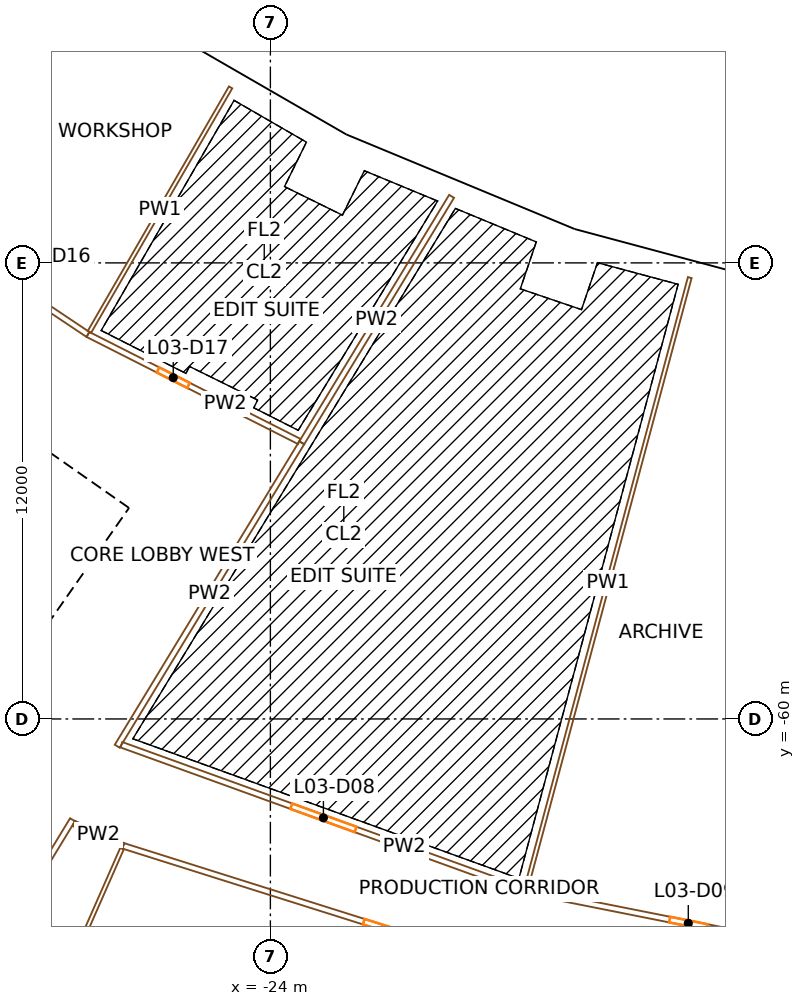
"""IFC4 building model, lengths in metres.
Left out: names, types, materials, properties, quantities, classifications, styles, units other than length and angle.
Written with IfcOpenShell. Run it as: python <this file> out.ifc"""

import sys

from ifc_helpers import new_model, si_unit, direction, frame, frame_2d, origin, origin_2d, place, context, subcontext, project, spatial, rectangle, extrude, element, fill, save


model = new_model("IFC4")
c1 = context("Model", 3, precision=1e-05, world=origin(), true_north=direction((0.0, 1.0)))
c2 = subcontext(c1, "Body", "Model", "MODEL_VIEW")
j1 = project(units=[si_unit("LENGTHUNIT", "METRE"), si_unit("PLANEANGLEUNIT", "RADIAN")], contexts=[c1])
p1 = place(None, origin())
s1 = spatial("IfcSite", under=j1, at=p1, CompositionType="ELEMENT")
p2 = place(p1, origin())
s2 = spatial("IfcBuilding", under=s1, at=p2, CompositionType="ELEMENT")
p3 = place(p2, frame((0.0, 0.0, 27.0)))
s3 = spatial("IfcBuildingStorey", under=s2, at=p3, CompositionType="ELEMENT", Elevation=27.0)
for number, where, z_axis, x_axis in (
    (1, (-28.195, -42.197, 0.0), (0.0, 0.0, 1.0), (0.831, -0.556, 0.0)),
    (2, (-22.446, -45.516, 0.0), (0.0, 0.0, 1.0), (0.897, -0.442, 0.0)),
):
    element("IfcColumn", number, at=place(p3, frame(where, z_axis=z_axis, x_axis=x_axis)), inside=s3, PredefinedType="COLUMN", context=c2, shape_type="SweptSolid", body=[
        extrude(rectangle(XDim=1.1, YDim=1.3, at=origin_2d()), origin(), (0.0, 0.0, 1.0), 4.5),
    ])
p4 = place(p3, frame((-25.763, -52.243, 0.0), z_axis=(0.0, 0.0, 1.0), x_axis=(0.896872741533, -0.442288690219, 0.0)))
e3 = element("IfcColumn", 3, at=p4, inside=s3, PredefinedType="COLUMN", context=c2, shape_type="SweptSolid", body=[
    extrude(rectangle(XDim=1.4, YDim=1.8, at=origin_2d()), origin(), (0.0, 0.0, 1.0), 4.5),
])
p5 = place(p3, frame((-16.313, -48.057, 0.0), z_axis=(0.0, 0.0, 1.0), x_axis=(0.946930129495, -0.321439465303, 0.0)))
e4 = element("IfcColumn", 4, at=p5, inside=s3, PredefinedType="COLUMN", context=c2, shape_type="SweptSolid", body=[
    extrude(rectangle(XDim=1.1, YDim=1.3, at=origin_2d()), origin(), (0.0, 0.0, 1.0), 4.5),
])
for number, where, z_axis, x_axis in (
    (5, (-18.724, -55.159, 0.0), (0.0, 0.0, 1.0), (0.947, -0.321, 0.0)),
    (6, (-11.364, -57.131, 0.0), (0.0, 0.0, 1.0), (0.981, -0.195, 0.0)),
):
    element("IfcColumn", number, at=place(p3, frame(where, z_axis=z_axis, x_axis=x_axis)), inside=s3, PredefinedType="COLUMN", context=c2, shape_type="SweptSolid", body=[
        extrude(rectangle(XDim=1.4, YDim=1.8, at=origin_2d()), origin(), (0.0, 0.0, 1.0), 4.5),
    ])
p6 = place(p3, frame((-36.717, -66.337, 0.0), z_axis=(0.0, 0.0, 1.0), x_axis=(0.573577477574, 0.819151315216, 0.0)))
e7 = element("IfcWall", 7, at=p6, inside=s3, PredefinedType="SHEAR", context=c2, shape_type="SweptSolid", body=[
    extrude(rectangle(XDim=14.8, YDim=0.9, at=frame_2d((7.4, 0.0))), origin(), (0.0, 0.0, 1.0), 4.1),
])
p7 = place(p6, frame((6.2, 0.0, 0.0)))
e8 = element("IfcOpeningElement", 8, at=p7, cuts=e7, PredefinedType="OPENING", context=c2, shape_type="SweptSolid", body=[
    extrude(rectangle(XDim=2.4, YDim=2.1, at=frame_2d((1.2, 1.05))), frame((0.0, 0.46, 0.0), z_axis=(0.0, -1.0, 0.0), x_axis=(1.0, 0.0, 0.0)), (0.0, 0.0, 1.0), 0.92),
])
p8 = place(p3, frame((-28.854, -54.324, 0.0), z_axis=(0.0, 0.0, 1.0), x_axis=(-0.819145767589, 0.573585400304, 0.0)))
e9 = element("IfcWall", 9, at=p8, inside=s3, PredefinedType="SHEAR", context=c2, shape_type="SweptSolid", body=[
    extrude(rectangle(XDim=15.045, YDim=0.9, at=frame_2d((7.523, 0.0))), origin(), (0.0, 0.0, 1.0), 4.1),
])
p9 = place(p8, frame((0.6, 0.0, 0.0)))
e10 = element("IfcOpeningElement", 10, at=p9, cuts=e9, PredefinedType="OPENING", context=c2, shape_type="SweptSolid", body=[
    extrude(rectangle(XDim=1.0, YDim=2.1, at=frame_2d((0.5, 1.05))), frame((0.0, 0.46, 0.0), z_axis=(0.0, -1.0, 0.0), x_axis=(1.0, 0.0, 0.0)), (0.0, 0.0, 1.0), 0.92),
])
p10 = place(p8, frame((3.275, 0.0, 0.0)))
e11 = element("IfcOpeningElement", 11, at=p10, cuts=e9, PredefinedType="OPENING", context=c2, shape_type="SweptSolid", body=[
    extrude(rectangle(XDim=1.0, YDim=2.1, at=frame_2d((0.5, 1.05))), frame((0.0, 0.46, 0.0), z_axis=(0.0, -1.0, 0.0), x_axis=(1.0, 0.0, 0.0)), (0.0, 0.0, 1.0), 0.92),
])
p11 = place(p8, frame((6.225, 0.0, 0.0)))
e12 = element("IfcOpeningElement", 12, at=p11, cuts=e9, PredefinedType="OPENING", context=c2, shape_type="SweptSolid", body=[
    extrude(rectangle(XDim=0.9, YDim=2.1, at=frame_2d((0.45, 1.05))), frame((0.0, 0.46, 0.0), z_axis=(0.0, -1.0, 0.0), x_axis=(1.0, 0.0, 0.0)), (0.0, 0.0, 1.0), 0.92),
])
p12 = place(p8, frame((13.495, 0.0, 0.0)))
e13 = element("IfcOpeningElement", 13, at=p12, cuts=e9, PredefinedType="OPENING", context=c2, shape_type="SweptSolid", body=[
    extrude(rectangle(XDim=1.1, YDim=2.1, at=frame_2d((0.55, 1.05))), frame((0.0, 0.46, 0.0), z_axis=(0.0, -1.0, 0.0), x_axis=(1.0, 0.0, 0.0)), (0.0, 0.0, 1.0), 0.92),
])
p13 = place(p3, frame((-22.155, -44.792, 0.0), z_axis=(0.0, 0.0, 1.0), x_axis=(-0.866022817921, 0.50000447882, 0.0)))
e14 = element("IfcWall", 14, at=p13, inside=s3, PredefinedType="SOLIDWALL", context=c2, shape_type="SweptSolid", body=[
    extrude(rectangle(XDim=6.419, YDim=0.45, at=frame_2d((3.21, 0.0))), origin(), (0.0, 0.0, 1.0), 3.2),
])
p14 = place(p13, frame((3.66, 0.0, 0.9)))
e15 = element("IfcOpeningElement", 15, at=p14, cuts=e14, PredefinedType="OPENING", context=c2, shape_type="SweptSolid", body=[
    extrude(rectangle(XDim=1.2, YDim=2.15, at=frame_2d((0.6, 1.075))), frame((0.0, 0.235, 0.0), z_axis=(0.0, -1.0, 0.0), x_axis=(1.0, 0.0, 0.0)), (0.0, 0.0, 1.0), 0.47),
])
p15 = place(p13, frame((1.56, 0.0, 0.9)))
e16 = element("IfcOpeningElement", 16, at=p15, cuts=e14, PredefinedType="OPENING", context=c2, shape_type="SweptSolid", body=[
    extrude(rectangle(XDim=1.2, YDim=2.15, at=frame_2d((0.6, 1.075))), frame((0.0, 0.235, 0.0), z_axis=(0.0, -1.0, 0.0), x_axis=(1.0, 0.0, 0.0)), (0.0, 0.0, 1.0), 0.47),
])
p16 = place(p3, frame((-16.036, -47.335, 0.0), z_axis=(0.0, 0.0, 1.0), x_axis=(-0.923877459804, 0.382688436284, 0.0)))
e17 = element("IfcWall", 17, at=p16, inside=s3, PredefinedType="SOLIDWALL", context=c2, shape_type="SweptSolid", body=[
    extrude(rectangle(XDim=6.597, YDim=0.45, at=frame_2d((3.299, 0.0))), origin(), (0.0, 0.0, 1.0), 3.2),
])
p17 = place(p16, frame((3.749, 0.0, 0.9)))
e18 = element("IfcOpeningElement", 18, at=p17, cuts=e17, PredefinedType="OPENING", context=c2, shape_type="SweptSolid", body=[
    extrude(rectangle(XDim=1.2, YDim=2.15, at=frame_2d((0.6, 1.075))), frame((0.0, 0.235, 0.0), z_axis=(0.0, -1.0, 0.0), x_axis=(1.0, 0.0, 0.0)), (0.0, 0.0, 1.0), 0.47),
])
p18 = place(p16, frame((1.648, 0.0, 0.9)))
e19 = element("IfcOpeningElement", 19, at=p18, cuts=e17, PredefinedType="OPENING", context=c2, shape_type="SweptSolid", body=[
    extrude(rectangle(XDim=1.2, YDim=2.15, at=frame_2d((0.6, 1.075))), frame((0.0, 0.235, 0.0), z_axis=(0.0, -1.0, 0.0), x_axis=(1.0, 0.0, 0.0)), (0.0, 0.0, 1.0), 0.47),
])
p19 = place(p3, frame((-9.807, -49.0, 0.0), z_axis=(0.0, 0.0, 1.0), x_axis=(-0.965926830738, 0.25881529642, 0.0)))
e20 = element("IfcWall", 20, at=p19, inside=s3, PredefinedType="SOLIDWALL", context=c2, shape_type="SweptSolid", body=[
    extrude(rectangle(XDim=6.419, YDim=0.45, at=frame_2d((3.209, 0.0))), origin(), (0.0, 0.0, 1.0), 3.2),
])
p20 = place(p19, frame((3.66, 0.0, 0.9)))
e21 = element("IfcOpeningElement", 21, at=p20, cuts=e20, PredefinedType="OPENING", context=c2, shape_type="SweptSolid", body=[
    extrude(rectangle(XDim=1.2, YDim=2.15, at=frame_2d((0.6, 1.075))), frame((0.0, 0.235, 0.0), z_axis=(0.0, -1.0, 0.0), x_axis=(1.0, 0.0, 0.0)), (0.0, 0.0, 1.0), 0.47),
])
p21 = place(p19, frame((1.56, 0.0, 0.9)))
e22 = element("IfcOpeningElement", 22, at=p21, cuts=e20, PredefinedType="OPENING", context=c2, shape_type="SweptSolid", body=[
    extrude(rectangle(XDim=1.2, YDim=2.15, at=frame_2d((0.6, 1.075))), frame((0.0, 0.235, 0.0), z_axis=(0.0, -1.0, 0.0), x_axis=(1.0, 0.0, 0.0)), (0.0, 0.0, 1.0), 0.47),
])
p22 = place(p3, frame((-35.065, -45.697, 0.0), z_axis=(0.0, 0.0, 1.0), x_axis=(0.831476555368, -0.555559841847, 0.0)))
e23 = element("IfcWall", 23, at=p22, inside=s3, PredefinedType="PARTITIONING", context=c2, shape_type="SweptSolid", body=[
    extrude(rectangle(XDim=7.534, YDim=0.15, at=frame_2d((3.767, 0.0))), origin(), (0.0, 0.0, 1.0), 3.1),
])
p23 = place(p22, frame((5.067, 0.0, 0.0)))
e24 = element("IfcOpeningElement", 24, at=p23, cuts=e23, PredefinedType="OPENING", context=c2, shape_type="SweptSolid", body=[
    extrude(rectangle(XDim=1.0, YDim=2.1, at=frame_2d((0.5, 1.05))), frame((0.0, 0.085, 0.0), z_axis=(0.0, -1.0, 0.0), x_axis=(1.0, 0.0, 0.0)), (0.0, 0.0, 1.0), 0.17),
])
p24 = place(p3, frame((-34.492, -78.383, 0.0), z_axis=(0.0, 0.0, 1.0), x_axis=(0.402767118416, 0.915302490067, 0.0)))
e25 = element("IfcWall", 25, at=p24, inside=s3, PredefinedType="PARTITIONING", context=c2, shape_type="SweptSolid", body=[
    extrude(rectangle(XDim=16.361, YDim=0.1, at=frame_2d((8.18, 0.0))), origin(), (0.0, 0.0, 1.0), 3.1),
])
p25 = place(p3, frame((-29.207, -62.652, 0.0), z_axis=(0.0, 0.0, 1.0), x_axis=(-0.519573423316, -0.854425805897, 0.0)))
e26 = element("IfcWall", 26, at=p25, inside=s3, PredefinedType="PARTITIONING", context=c2, shape_type="SweptSolid", body=[
    extrude(rectangle(XDim=9.726, YDim=0.15, at=frame_2d((4.863, 0.0))), origin(), (0.0, 0.0, 1.0), 3.1),
])
p26 = place(p25, frame((4.413, 0.0, 0.0)))
e27 = element("IfcOpeningElement", 27, at=p26, cuts=e26, PredefinedType="OPENING", context=c2, shape_type="SweptSolid", body=[
    extrude(rectangle(XDim=0.9, YDim=2.1, at=frame_2d((0.45, 1.05))), frame((0.0, 0.085, 0.0), z_axis=(0.0, -1.0, 0.0), x_axis=(1.0, 0.0, 0.0)), (0.0, 0.0, 1.0), 0.17),
])
p27 = place(p3, frame((-29.177, -62.747, 0.0), z_axis=(0.0, 0.0, 1.0), x_axis=(0.91081521274, -0.41281430237, 0.0)))
e28 = element("IfcWall", 28, at=p27, inside=s3, PredefinedType="PARTITIONING", context=c2, shape_type="SweptSolid", body=[
    extrude(rectangle(XDim=1.433, YDim=0.15, at=frame_2d((0.716, 0.0))), origin(), (0.0, 0.0, 1.0), 3.1),
])
p28 = place(p3, frame((-28.8, -49.883, 0.0), z_axis=(0.0, 0.0, 1.0), x_axis=(0.892095791335, -0.451846322418, 0.0)))
e29 = element("IfcWall", 29, at=p28, inside=s3, PredefinedType="PARTITIONING", context=c2, shape_type="SweptSolid", body=[
    extrude(rectangle(XDim=6.231, YDim=0.15, at=frame_2d((3.116, 0.0))), origin(), (0.0, 0.0, 1.0), 3.1),
])
p29 = place(p28, frame((2.066, 0.0, 0.0)))
e30 = element("IfcOpeningElement", 30, at=p29, cuts=e29, PredefinedType="OPENING", context=c2, shape_type="SweptSolid", body=[
    extrude(rectangle(XDim=0.9, YDim=2.1, at=frame_2d((0.45, 1.05))), frame((0.0, 0.085, 0.0), z_axis=(0.0, -1.0, 0.0), x_axis=(1.0, 0.0, 0.0)), (0.0, 0.0, 1.0), 0.17),
])
p30 = place(p3, frame((-27.92, -60.678, 0.0), z_axis=(0.0, 0.0, 1.0), x_axis=(0.940369024046, -0.340155991589, 0.0)))
e31 = element("IfcWall", 31, at=p30, inside=s3, PredefinedType="PARTITIONING", context=c2, shape_type="SweptSolid", body=[
    extrude(rectangle(XDim=11.305, YDim=0.15, at=frame_2d((5.652, 0.0))), origin(), (0.0, 0.0, 1.0), 3.1),
])
p31 = place(p30, frame((4.752, 0.0, 0.0)))
e32 = element("IfcOpeningElement", 32, at=p31, cuts=e31, PredefinedType="OPENING", context=c2, shape_type="SweptSolid", body=[
    extrude(rectangle(XDim=1.8, YDim=2.1, at=frame_2d((0.9, 1.05))), frame((0.0, 0.085, 0.0), z_axis=(0.0, -1.0, 0.0), x_axis=(1.0, 0.0, 0.0)), (0.0, 0.0, 1.0), 0.17),
])
p32 = place(p3, frame((-13.5, -67.87, 0.0), z_axis=(0.0, 0.0, 1.0), x_axis=(-0.953714063006, 0.300714958099, 0.0)))
e33 = element("IfcWall", 33, at=p32, inside=s3, PredefinedType="PARTITIONING", context=c2, shape_type="SweptSolid", body=[
    extrude(rectangle(XDim=15.069, YDim=0.15, at=frame_2d((7.535, 0.0))), origin(), (0.0, 0.0, 1.0), 3.1),
])
p33 = place(p32, frame((6.635, 0.0, 0.0)))
e34 = element("IfcOpeningElement", 34, at=p33, cuts=e33, PredefinedType="OPENING", context=c2, shape_type="SweptSolid", body=[
    extrude(rectangle(XDim=1.8, YDim=2.1, at=frame_2d((0.9, 1.05))), frame((0.0, 0.085, 0.0), z_axis=(0.0, -1.0, 0.0), x_axis=(1.0, 0.0, 0.0)), (0.0, 0.0, 1.0), 0.17),
])
p34 = place(p3, frame((-25.047, -43.382, 0.0), z_axis=(0.0, 0.0, 1.0), x_axis=(-0.500011569389, -0.866018724091, 0.0)))
e35 = element("IfcWall", 35, at=p34, inside=s3, PredefinedType="PARTITIONING", context=c2, shape_type="SweptSolid", body=[
    extrude(rectangle(XDim=7.431, YDim=0.1, at=frame_2d((3.716, 0.0))), origin(), (0.0, 0.0, 1.0), 3.1),
])
p35 = place(p3, frame((-23.174, -52.732, 0.0), z_axis=(0.0, 0.0, 1.0), x_axis=(-0.519577254173, -0.854423476355, 0.0)))
e36 = element("IfcWall", 36, at=p35, inside=s3, PredefinedType="PARTITIONING", context=c2, shape_type="SweptSolid", body=[
    extrude(rectangle(XDim=9.345, YDim=0.15, at=frame_2d((4.672, 0.0))), origin(), (0.0, 0.0, 1.0), 3.1),
])
p36 = place(p3, frame((-19.231, -46.249, 0.0), z_axis=(0.0, 0.0, 1.0), x_axis=(-0.519582509181, -0.854420280748, 0.0)))
e37 = element("IfcWall", 37, at=p36, inside=s3, PredefinedType="PARTITIONING", context=c2, shape_type="SweptSolid", body=[
    extrude(rectangle(XDim=7.588, YDim=0.15, at=frame_2d((3.794, 0.0))), origin(), (0.0, 0.0, 1.0), 3.1),
])
p37 = place(p3, frame((-17.289, -64.524, 0.0), z_axis=(0.0, 0.0, 1.0), x_axis=(0.980786466832, -0.195084357342, 0.0)))
e38 = element("IfcWall", 38, at=p37, inside=s3, PredefinedType="PARTITIONING", context=c2, shape_type="SweptSolid", body=[
    extrude(rectangle(XDim=8.738, YDim=0.15, at=frame_2d((4.369, 0.0))), origin(), (0.0, 0.0, 1.0), 3.1),
])
p38 = place(p37, frame((3.869, 0.0, 0.0)))
e39 = element("IfcOpeningElement", 39, at=p38, cuts=e38, PredefinedType="OPENING", context=c2, shape_type="SweptSolid", body=[
    extrude(rectangle(XDim=1.0, YDim=2.1, at=frame_2d((0.5, 1.05))), frame((0.0, 0.085, 0.0), z_axis=(0.0, -1.0, 0.0), x_axis=(1.0, 0.0, 0.0)), (0.0, 0.0, 1.0), 0.17),
])
p39 = place(p3, frame((-12.965, -48.386, 0.0), z_axis=(0.0, 0.0, 1.0), x_axis=(-0.258824622624, -0.965924331779, 0.0)))
e40 = element("IfcWall", 40, at=p39, inside=s3, PredefinedType="PARTITIONING", context=c2, shape_type="SweptSolid", body=[
    extrude(rectangle(XDim=16.632, YDim=0.1, at=frame_2d((8.316, 0.0))), origin(), (0.0, 0.0, 1.0), 3.1),
])
p40 = place(p9, origin())
e41 = element("IfcDoor", 41, at=p40, inside=s3, OperationType="SINGLE_SWING_RIGHT", PredefinedType="DOOR", context=c2, shape_type="SweptSolid", body=[
    extrude(rectangle(XDim=1.0, YDim=2.1, at=frame_2d((0.5, 1.05))), frame((0.0, 0.025, 0.0), z_axis=(0.0, -1.0, 0.0), x_axis=(1.0, 0.0, 0.0)), (0.0, 0.0, 1.0), 0.05),
])
fill(e10, e41)
p41 = place(p14, origin())
e42 = element("IfcWindow", 42, at=p41, inside=s3, PartitioningType="SINGLE_PANEL", PredefinedType="WINDOW", context=c2, shape_type="SweptSolid", body=[
    extrude(rectangle(XDim=1.2, YDim=2.15, at=frame_2d((0.6, 1.075))), frame((0.0, 0.03, 0.0), z_axis=(0.0, -1.0, 0.0), x_axis=(1.0, 0.0, 0.0)), (0.0, 0.0, 1.0), 0.06),
])
fill(e15, e42)
p42 = place(p15, origin())
e43 = element("IfcWindow", 43, at=p42, inside=s3, PartitioningType="SINGLE_PANEL", PredefinedType="WINDOW", context=c2, shape_type="SweptSolid", body=[
    extrude(rectangle(XDim=1.2, YDim=2.15, at=frame_2d((0.6, 1.075))), frame((0.0, 0.03, 0.0), z_axis=(0.0, -1.0, 0.0), x_axis=(1.0, 0.0, 0.0)), (0.0, 0.0, 1.0), 0.06),
])
fill(e16, e43)
p43 = place(p17, origin())
e44 = element("IfcWindow", 44, at=p43, inside=s3, PartitioningType="SINGLE_PANEL", PredefinedType="WINDOW", context=c2, shape_type="SweptSolid", body=[
    extrude(rectangle(XDim=1.2, YDim=2.15, at=frame_2d((0.6, 1.075))), frame((0.0, 0.03, 0.0), z_axis=(0.0, -1.0, 0.0), x_axis=(1.0, 0.0, 0.0)), (0.0, 0.0, 1.0), 0.06),
])
fill(e18, e44)
p44 = place(p18, origin())
e45 = element("IfcWindow", 45, at=p44, inside=s3, PartitioningType="SINGLE_PANEL", PredefinedType="WINDOW", context=c2, shape_type="SweptSolid", body=[
    extrude(rectangle(XDim=1.2, YDim=2.15, at=frame_2d((0.6, 1.075))), frame((0.0, 0.03, 0.0), z_axis=(0.0, -1.0, 0.0), x_axis=(1.0, 0.0, 0.0)), (0.0, 0.0, 1.0), 0.06),
])
fill(e19, e45)
p45 = place(p20, origin())
e46 = element("IfcWindow", 46, at=p45, inside=s3, PartitioningType="SINGLE_PANEL", PredefinedType="WINDOW", context=c2, shape_type="SweptSolid", body=[
    extrude(rectangle(XDim=1.2, YDim=2.15, at=frame_2d((0.6, 1.075))), frame((0.0, 0.03, 0.0), z_axis=(0.0, -1.0, 0.0), x_axis=(1.0, 0.0, 0.0)), (0.0, 0.0, 1.0), 0.06),
])
fill(e21, e46)
p46 = place(p21, origin())
e47 = element("IfcWindow", 47, at=p46, inside=s3, PartitioningType="SINGLE_PANEL", PredefinedType="WINDOW", context=c2, shape_type="SweptSolid", body=[
    extrude(rectangle(XDim=1.2, YDim=2.15, at=frame_2d((0.6, 1.075))), frame((0.0, 0.03, 0.0), z_axis=(0.0, -1.0, 0.0), x_axis=(1.0, 0.0, 0.0)), (0.0, 0.0, 1.0), 0.06),
])
fill(e22, e47)
p47 = place(p33, origin())
e48 = element("IfcDoor", 48, at=p47, inside=s3, OperationType="DOUBLE_DOOR_SINGLE_SWING", PredefinedType="DOOR", context=c2, shape_type="SweptSolid", body=[
    extrude(rectangle(XDim=1.8, YDim=2.1, at=frame_2d((0.9, 1.05))), frame((0.0, 0.025, 0.0), z_axis=(0.0, -1.0, 0.0), x_axis=(1.0, 0.0, 0.0)), (0.0, 0.0, 1.0), 0.05),
])
fill(e34, e48)
p48 = place(p31, origin())
e49 = element("IfcDoor", 49, at=p48, inside=s3, OperationType="DOUBLE_DOOR_SINGLE_SWING", PredefinedType="DOOR", context=c2, shape_type="SweptSolid", body=[
    extrude(rectangle(XDim=1.8, YDim=2.1, at=frame_2d((0.9, 1.05))), frame((0.0, 0.025, 0.0), z_axis=(0.0, -1.0, 0.0), x_axis=(1.0, 0.0, 0.0)), (0.0, 0.0, 1.0), 0.05),
])
fill(e32, e49)
p49 = place(p38, origin())
e50 = element("IfcDoor", 50, at=p49, inside=s3, OperationType="SINGLE_SWING_RIGHT", PredefinedType="DOOR", context=c2, shape_type="SweptSolid", body=[
    extrude(rectangle(XDim=1.0, YDim=2.1, at=frame_2d((0.5, 1.05))), frame((0.0, 0.025, 0.0), z_axis=(0.0, -1.0, 0.0), x_axis=(1.0, 0.0, 0.0)), (0.0, 0.0, 1.0), 0.05),
])
fill(e39, e50)
p50 = place(p29, origin())
e51 = element("IfcDoor", 51, at=p50, inside=s3, OperationType="SINGLE_SWING_LEFT", PredefinedType="DOOR", context=c2, shape_type="SweptSolid", body=[
    extrude(rectangle(XDim=0.9, YDim=2.1, at=frame_2d((0.45, 1.05))), frame((0.0, 0.025, 0.0), z_axis=(0.0, -1.0, 0.0), x_axis=(1.0, 0.0, 0.0)), (0.0, 0.0, 1.0), 0.05),
])
fill(e30, e51)
save(model, sys.argv[1])
